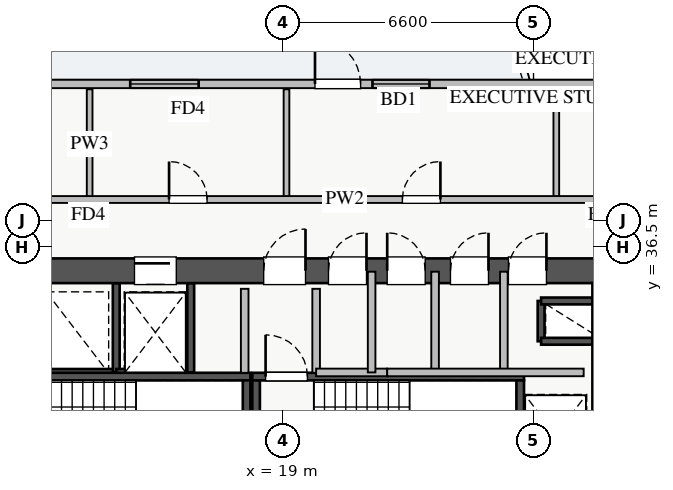
"""IFC4 building model, lengths in metres.
Left out: names, types, materials, properties, quantities, classifications, styles, units other than length and angle.
Written with IfcOpenShell. Run it as: python <this file> out.ifc"""

import sys

from ifc_helpers import new_model, si_unit, direction, frame, frame_2d, origin, place, context, subcontext, project, spatial, rectangle, extrude, source, transform, mapped, element, fill, save


model = new_model("IFC4")
c1 = context("Model", 3, precision=1e-05, world=origin(), true_north=direction((0.0, 1.0)))
c2 = subcontext(c1, "Body", "Model", "MODEL_VIEW")
j1 = project(units=[si_unit("LENGTHUNIT", "METRE"), si_unit("PLANEANGLEUNIT", "RADIAN")], contexts=[c1])
p1 = place(None, origin())
s1 = spatial("IfcSite", under=j1, at=p1, CompositionType="ELEMENT")
p2 = place(p1, origin())
s2 = spatial("IfcBuilding", under=s1, at=p2, CompositionType="ELEMENT")
p3 = place(p2, frame((0.0, 0.0, 113.25)))
s3 = spatial("IfcBuildingStorey", under=s2, at=p3, CompositionType="ELEMENT", Elevation=113.25)
p4 = place(p3, frame((12.68, 33.2, 0.0), z_axis=(0.0, 0.0, 1.0), x_axis=(1.0, 0.0, 0.0)))
e1 = element("IfcWall", 1, at=p4, inside=s3, PredefinedType="SHEAR", context=c2, shape_type="SweptSolid", body=[
    extrude(rectangle(XDim=1.94, YDim=0.18, at=frame_2d((0.97, 0.0))), origin(), (0.0, 0.0, 1.0), 3.07),
])
p5 = place(p3, frame((14.62, 33.2, 0.0), z_axis=(0.0, 0.0, 1.0), x_axis=(0.0, 1.0, 0.0)))
e2 = element("IfcWall", 2, at=p5, inside=s3, PredefinedType="SHEAR", context=c2, shape_type="SweptSolid", body=[
    extrude(rectangle(XDim=2.35, YDim=0.18, at=frame_2d((1.175, 0.0))), origin(), (0.0, 0.0, 1.0), 3.07),
])
p6 = place(p3, frame((25.8, 34.02, 0.0), z_axis=(0.0, 0.0, 1.0), x_axis=(0.0, 1.0, 0.0)))
e3 = element("IfcWall", 3, at=p6, inside=s3, PredefinedType="SHEAR", context=c2, shape_type="SweptSolid", body=[
    extrude(rectangle(XDim=1.06, YDim=0.18, at=frame_2d((0.53, 0.0))), origin(), (0.0, 0.0, 1.0), 3.07),
])
for number, where, z_axis, x_axis in (
    (4, (25.8, 35.08, 0.0), (0.0, 0.0, 1.0), (1.0, 0.0, 0.0)),
    (5, (25.8, 34.02, 0.0), (0.0, 0.0, 1.0), (1.0, 0.0, 0.0)),
):
    element("IfcWall", number, at=place(p3, frame(where, z_axis=z_axis, x_axis=x_axis)), inside=s3, PredefinedType="SHEAR", context=c2, shape_type="SweptSolid", body=[
        extrude(rectangle(XDim=1.35, YDim=0.18, at=frame_2d((0.675, 0.0))), origin(), (0.0, 0.0, 1.0), 3.07),
    ])
p7 = place(p3, frame((14.62, 33.2, 0.0), z_axis=(0.0, 0.0, 1.0), x_axis=(1.0, 0.0, 0.0)))
e6 = element("IfcWall", 6, at=p7, inside=s3, PredefinedType="SHEAR", context=c2, shape_type="SweptSolid", body=[
    extrude(rectangle(XDim=1.96, YDim=0.18, at=frame_2d((0.98, 0.0))), origin(), (0.0, 0.0, 1.0), 3.07),
])
p8 = place(p3, frame((16.58, 33.2, 0.0), z_axis=(0.0, 0.0, 1.0), x_axis=(0.0, 1.0, 0.0)))
e7 = element("IfcWall", 7, at=p8, inside=s3, PredefinedType="SHEAR", context=c2, shape_type="SweptSolid", body=[
    extrude(rectangle(XDim=2.35, YDim=0.18, at=frame_2d((1.175, 0.0))), origin(), (0.0, 0.0, 1.0), 3.07),
])
p9 = place(p3, frame((10.85, 33.09, 0.0), z_axis=(0.0, 0.0, 1.0), x_axis=(1.0, 0.0, 0.0)))
e8 = element("IfcWall", 8, at=p9, inside=s3, PredefinedType="SHEAR", context=c2, shape_type="SweptSolid", body=[
    extrude(rectangle(XDim=7.3, YDim=0.2, at=frame_2d((3.65, 0.0))), origin(), (0.0, 0.0, 1.0), 3.25),
])
p10 = place(p9, frame((0.35, 0.0, 0.0)))
e9 = element("IfcOpeningElement", 9, at=p10, cuts=e8, PredefinedType="OPENING", context=c2, shape_type="SweptSolid", body=[
    extrude(rectangle(XDim=1.1, YDim=2.05, at=frame_2d((0.55, 1.025))), frame((0.0, 0.11, 0.0), z_axis=(0.0, -1.0, 0.0), x_axis=(1.0, 0.0, 0.0)), (0.0, 0.0, 1.0), 0.22),
])
p11 = place(p3, frame((18.05, 30.05, 0.0), z_axis=(0.0, 0.0, 1.0), x_axis=(0.0, 1.0, 0.0)))
e10 = element("IfcWall", 10, at=p11, inside=s3, PredefinedType="SHEAR", context=c2, shape_type="SweptSolid", body=[
    extrude(rectangle(XDim=2.94, YDim=0.2, at=frame_2d((1.47, 0.0))), origin(), (0.0, 0.0, 1.0), 3.25),
])
p12 = place(p3, frame((18.2, 33.09, 0.0), z_axis=(0.0, 0.0, 1.0), x_axis=(1.0, 0.0, 0.0)))
e11 = element("IfcWall", 11, at=p12, inside=s3, PredefinedType="SHEAR", context=c2, shape_type="SweptSolid", body=[
    extrude(rectangle(XDim=7.15, YDim=0.2, at=frame_2d((3.575, 0.0))), origin(), (0.0, 0.0, 1.0), 3.25),
])
p13 = place(p12, frame((0.35, 0.0, 0.0)))
e12 = element("IfcOpeningElement", 12, at=p13, cuts=e11, PredefinedType="OPENING", context=c2, shape_type="SweptSolid", body=[
    extrude(rectangle(XDim=1.1, YDim=2.05, at=frame_2d((0.55, 1.025))), frame((0.0, 0.11, 0.0), z_axis=(0.0, -1.0, 0.0), x_axis=(1.0, 0.0, 0.0)), (0.0, 0.0, 1.0), 0.22),
])
for number, where, z_axis, x_axis in (
    (13, (18.3, 30.05, 0.0), (0.0, 0.0, 1.0), (0.0, 1.0, 0.0)),
    (14, (25.25, 30.05, 0.0), (0.0, 0.0, 1.0), (0.0, 1.0, 0.0)),
):
    element("IfcWall", number, at=place(p3, frame(where, z_axis=z_axis, x_axis=x_axis)), inside=s3, PredefinedType="SHEAR", context=c2, shape_type="SweptSolid", body=[
        extrude(rectangle(XDim=2.94, YDim=0.2, at=frame_2d((1.47, 0.0))), origin(), (0.0, 0.0, 1.0), 3.25),
    ])
p14 = place(p3, frame((10.2, 35.875, 0.0), z_axis=(0.0, 0.0, 1.0), x_axis=(1.0, 0.0, 0.0)))
e15 = element("IfcWall", 15, at=p14, inside=s3, PredefinedType="SHEAR", context=c2, shape_type="SweptSolid", body=[
    extrude(rectangle(XDim=17.6, YDim=0.65, at=frame_2d((8.8, 0.0))), origin(), (0.0, 0.0, 1.0), 3.25),
])
p15 = place(p14, frame((1.15, 0.0, 0.0)))
e16 = element("IfcOpeningElement", 16, at=p15, cuts=e15, PredefinedType="OPENING", context=c2, shape_type="SweptSolid", body=[
    extrude(rectangle(XDim=1.1, YDim=2.05, at=frame_2d((0.55, 1.025))), frame((0.0, 0.335, 0.0), z_axis=(0.0, -1.0, 0.0), x_axis=(1.0, 0.0, 0.0)), (0.0, 0.0, 1.0), 0.67),
])
p16 = place(p14, frame((8.3, 0.0, 0.0)))
e17 = element("IfcOpeningElement", 17, at=p16, cuts=e15, PredefinedType="OPENING", context=c2, shape_type="SweptSolid", body=[
    extrude(rectangle(XDim=1.1, YDim=2.05, at=frame_2d((0.55, 1.025))), frame((0.0, 0.335, 0.0), z_axis=(0.0, -1.0, 0.0), x_axis=(1.0, 0.0, 0.0)), (0.0, 0.0, 1.0), 0.67),
])
p17 = place(p14, frame((4.9, 0.0, 0.0)))
e18 = element("IfcOpeningElement", 18, at=p17, cuts=e15, PredefinedType="OPENING", context=c2, shape_type="SweptSolid", body=[
    extrude(rectangle(XDim=1.1, YDim=2.05, at=frame_2d((0.55, 1.025))), frame((0.0, 0.335, 0.0), z_axis=(0.0, -1.0, 0.0), x_axis=(1.0, 0.0, 0.0)), (0.0, 0.0, 1.0), 0.67),
])
p18 = place(p14, frame((14.74, 0.0, 0.0)))
e19 = element("IfcOpeningElement", 19, at=p18, cuts=e15, PredefinedType="OPENING", context=c2, shape_type="SweptSolid", body=[
    extrude(rectangle(XDim=1.0, YDim=2.05, at=frame_2d((0.5, 1.025))), frame((0.0, 0.335, 0.0), z_axis=(0.0, -1.0, 0.0), x_axis=(1.0, 0.0, 0.0)), (0.0, 0.0, 1.0), 0.67),
])
p19 = place(p14, frame((10.005, 0.0, 0.0)))
e20 = element("IfcOpeningElement", 20, at=p19, cuts=e15, PredefinedType="OPENING", context=c2, shape_type="SweptSolid", body=[
    extrude(rectangle(XDim=1.0, YDim=2.05, at=frame_2d((0.5, 1.025))), frame((0.0, 0.335, 0.0), z_axis=(0.0, -1.0, 0.0), x_axis=(1.0, 0.0, 0.0)), (0.0, 0.0, 1.0), 0.67),
])
p20 = place(p14, frame((11.55, 0.0, 0.0)))
e21 = element("IfcOpeningElement", 21, at=p20, cuts=e15, PredefinedType="OPENING", context=c2, shape_type="SweptSolid", body=[
    extrude(rectangle(XDim=1.0, YDim=2.05, at=frame_2d((0.5, 1.025))), frame((0.0, 0.335, 0.0), z_axis=(0.0, -1.0, 0.0), x_axis=(1.0, 0.0, 0.0)), (0.0, 0.0, 1.0), 0.67),
])
p21 = place(p14, frame((13.215, 0.0, 0.0)))
e22 = element("IfcOpeningElement", 22, at=p21, cuts=e15, PredefinedType="OPENING", context=c2, shape_type="SweptSolid", body=[
    extrude(rectangle(XDim=1.0, YDim=2.05, at=frame_2d((0.5, 1.025))), frame((0.0, 0.335, 0.0), z_axis=(0.0, -1.0, 0.0), x_axis=(1.0, 0.0, 0.0)), (0.0, 0.0, 1.0), 0.67),
])
p22 = place(p3, frame((27.475, 29.65, 0.0), z_axis=(0.0, 0.0, 1.0), x_axis=(0.0, 1.0, 0.0)))
e23 = element("IfcWall", 23, at=p22, inside=s3, PredefinedType="SHEAR", context=c2, shape_type="SweptSolid", body=[
    extrude(rectangle(XDim=5.9, YDim=0.65, at=frame_2d((2.95, 0.0))), origin(), (0.0, 0.0, 1.0), 3.25),
])
p23 = place(p22, frame((1.1, 0.0, 0.0)))
e24 = element("IfcOpeningElement", 24, at=p23, cuts=e23, PredefinedType="OPENING", context=c2, shape_type="SweptSolid", body=[
    extrude(rectangle(XDim=1.3, YDim=2.05, at=frame_2d((0.65, 1.025))), frame((0.0, 0.335, 0.0), z_axis=(0.0, -1.0, 0.0), x_axis=(1.0, 0.0, 0.0)), (0.0, 0.0, 1.0), 0.67),
])
p24 = place(p3, frame((6.55, 40.79, 0.0), z_axis=(0.0, 0.0, 1.0), x_axis=(1.0, 0.0, 0.0)))
e25 = element("IfcWall", 25, at=p24, inside=s3, PredefinedType="STANDARD", context=c2, shape_type="SweptSolid", body=[
    extrude(rectangle(XDim=24.9, YDim=0.22, at=frame_2d((12.45, 0.0))), origin(), (0.0, 0.0, 1.0), 2.61),
])
p25 = place(p24, frame((13.3, 0.0, 0.0)))
e26 = element("IfcOpeningElement", 26, at=p25, cuts=e25, PredefinedType="OPENING", context=c2, shape_type="SweptSolid", body=[
    extrude(rectangle(XDim=1.2, YDim=2.1, at=frame_2d((0.6, 1.05))), frame((0.0, 0.12, 0.0), z_axis=(0.0, -1.0, 0.0), x_axis=(1.0, 0.0, 0.0)), (0.0, 0.0, 1.0), 0.24),
])
p26 = place(p24, frame((3.635, 0.0, 0.9)))
e27 = element("IfcOpeningElement", 27, at=p26, cuts=e25, PredefinedType="OPENING", context=c2, shape_type="SweptSolid", body=[
    extrude(rectangle(XDim=2.4, YDim=1.5, at=frame_2d((1.2, 0.75))), frame((0.0, 0.12, 0.0), z_axis=(0.0, -1.0, 0.0), x_axis=(1.0, 0.0, 0.0)), (0.0, 0.0, 1.0), 0.24),
])
p27 = place(p24, frame((8.438, 0.0, 0.9)))
e28 = element("IfcOpeningElement", 28, at=p27, cuts=e25, PredefinedType="OPENING", context=c2, shape_type="SweptSolid", body=[
    extrude(rectangle(XDim=1.8, YDim=1.45, at=frame_2d((0.9, 0.725))), frame((0.0, 0.12, 0.0), z_axis=(0.0, -1.0, 0.0), x_axis=(1.0, 0.0, 0.0)), (0.0, 0.0, 1.0), 0.24),
])
p28 = place(p24, frame((14.813, 0.0, 0.9)))
e29 = element("IfcOpeningElement", 29, at=p28, cuts=e25, PredefinedType="OPENING", context=c2, shape_type="SweptSolid", body=[
    extrude(rectangle(XDim=1.5, YDim=1.45, at=frame_2d((0.75, 0.725))), frame((0.0, 0.12, 0.0), z_axis=(0.0, -1.0, 0.0), x_axis=(1.0, 0.0, 0.0)), (0.0, 0.0, 1.0), 0.24),
])
p29 = place(p24, frame((20.738, 0.0, 0.9)))
e30 = element("IfcOpeningElement", 30, at=p29, cuts=e25, PredefinedType="OPENING", context=c2, shape_type="SweptSolid", body=[
    extrude(rectangle(XDim=2.1, YDim=1.48, at=frame_2d((1.05, 0.74))), frame((0.0, 0.12, 0.0), z_axis=(0.0, -1.0, 0.0), x_axis=(1.0, 0.0, 0.0)), (0.0, 0.0, 1.0), 0.24),
])
p30 = place(p24, frame((0.258, 0.0, 0.9)))
e31 = element("IfcOpeningElement", 31, at=p30, cuts=e25, PredefinedType="OPENING", context=c2, shape_type="SweptSolid", body=[
    extrude(rectangle(XDim=1.8, YDim=1.5, at=frame_2d((0.9, 0.75))), frame((0.0, 0.12, 0.0), z_axis=(0.0, -1.0, 0.0), x_axis=(1.0, 0.0, 0.0)), (0.0, 0.0, 1.0), 0.24),
])
for number, where, z_axis, x_axis in (
    (32, (18.0, 33.19, 0.0), (0.0, 0.0, 1.0), (0.0, 1.0, 0.0)),
    (33, (19.88, 33.19, 0.0), (0.0, 0.0, 1.0), (0.0, 1.0, 0.0)),
):
    element("IfcWall", number, at=place(p3, frame(where, z_axis=z_axis, x_axis=x_axis)), inside=s3, PredefinedType="PARTITIONING", context=c2, shape_type="SweptSolid", body=[
        extrude(rectangle(XDim=2.21, YDim=0.2, at=frame_2d((1.105, 0.0))), origin(), (0.0, 0.0, 1.0), 3.07),
    ])
p31 = place(p3, frame((24.82, 33.2, 0.0), z_axis=(0.0, 0.0, 1.0), x_axis=(0.0, 1.0, 0.0)))
e34 = element("IfcWall", 34, at=p31, inside=s3, PredefinedType="PARTITIONING", context=c2, shape_type="SweptSolid", body=[
    extrude(rectangle(XDim=2.65, YDim=0.2, at=frame_2d((1.325, 0.0))), origin(), (0.0, 0.0, 1.0), 3.07),
])
p32 = place(p3, frame((19.88, 33.2, 0.0), z_axis=(0.0, 0.0, 1.0), x_axis=(1.0, 0.0, 0.0)))
e35 = element("IfcWall", 35, at=p32, inside=s3, PredefinedType="PARTITIONING", context=c2, shape_type="SweptSolid", body=[
    extrude(rectangle(XDim=1.87, YDim=0.2, at=frame_2d((0.935, 0.0))), origin(), (0.0, 0.0, 1.0), 3.07),
])
for number, where, z_axis, x_axis in (
    (36, (21.34, 33.2, 0.0), (0.0, 0.0, 1.0), (0.0, 1.0, 0.0)),
    (37, (23.01, 33.2, 0.0), (0.0, 0.0, 1.0), (0.0, 1.0, 0.0)),
):
    element("IfcWall", number, at=place(p3, frame(where, z_axis=z_axis, x_axis=x_axis)), inside=s3, PredefinedType="PARTITIONING", context=c2, shape_type="SweptSolid", body=[
        extrude(rectangle(XDim=2.65, YDim=0.2, at=frame_2d((1.325, 0.0))), origin(), (0.0, 0.0, 1.0), 3.07),
    ])
p33 = place(p3, frame((21.75, 33.2, 0.0), z_axis=(0.0, 0.0, 1.0), x_axis=(1.0, 0.0, 0.0)))
e38 = element("IfcWall", 38, at=p33, inside=s3, PredefinedType="PARTITIONING", context=c2, shape_type="SweptSolid", body=[
    extrude(rectangle(XDim=5.17, YDim=0.2, at=frame_2d((2.585, 0.0))), origin(), (0.0, 0.0, 1.0), 3.07),
])
p34 = place(p3, frame((13.92, 37.75, 0.0), z_axis=(0.0, 0.0, 1.0), x_axis=(0.0, 1.0, 0.0)))
e39 = element("IfcWall", 39, at=p34, inside=s3, PredefinedType="PARTITIONING", context=c2, shape_type="SweptSolid", body=[
    extrude(rectangle(XDim=2.9, YDim=0.15, at=frame_2d((1.45, 0.0))), origin(), (0.0, 0.0, 1.0), 3.07),
])
p35 = place(p3, frame((19.1, 37.75, 0.0), z_axis=(0.0, 0.0, 1.0), x_axis=(0.0, 1.0, 0.0)))
e40 = element("IfcWall", 40, at=p35, inside=s3, PredefinedType="PARTITIONING", context=c2, shape_type="SweptSolid", body=[
    extrude(rectangle(XDim=2.9, YDim=0.15, at=frame_2d((1.45, 0.0))), origin(), (0.0, 0.0, 1.0), 2.771),
])
p36 = place(p3, frame((26.2, 37.75, 0.0), z_axis=(0.0, 0.0, 1.0), x_axis=(0.0, 1.0, 0.0)))
e41 = element("IfcWall", 41, at=p36, inside=s3, PredefinedType="PARTITIONING", context=c2, shape_type="SweptSolid", body=[
    extrude(rectangle(XDim=2.9, YDim=0.15, at=frame_2d((1.45, 0.0))), origin(), (0.0, 0.0, 1.0), 3.07),
])
p37 = place(p3, frame((8.85, 37.75, 0.0), z_axis=(0.0, 0.0, 1.0), x_axis=(1.0, 0.0, 0.0)))
e42 = element("IfcWall", 42, at=p37, inside=s3, PredefinedType="PARTITIONING", context=c2, shape_type="SweptSolid", body=[
    extrude(rectangle(XDim=23.57, YDim=0.18, at=frame_2d((11.785, 0.0))), origin(), (0.0, 0.0, 1.0), 3.07),
])
p38 = place(p37, frame((2.035, 0.0, 0.0)))
e43 = element("IfcOpeningElement", 43, at=p38, cuts=e42, PredefinedType="OPENING", context=c2, shape_type="SweptSolid", body=[
    extrude(rectangle(XDim=1.0, YDim=2.05, at=frame_2d((0.5, 1.025))), frame((0.0, 0.1, 0.0), z_axis=(0.0, -1.0, 0.0), x_axis=(1.0, 0.0, 0.0)), (0.0, 0.0, 1.0), 0.2),
])
p39 = place(p37, frame((7.16, 0.0, 0.0)))
e44 = element("IfcOpeningElement", 44, at=p39, cuts=e42, PredefinedType="OPENING", context=c2, shape_type="SweptSolid", body=[
    extrude(rectangle(XDim=1.0, YDim=2.05, at=frame_2d((0.5, 1.025))), frame((0.0, 0.1, 0.0), z_axis=(0.0, -1.0, 0.0), x_axis=(1.0, 0.0, 0.0)), (0.0, 0.0, 1.0), 0.2),
])
p40 = place(p37, frame((13.3, 0.0, 0.0)))
e45 = element("IfcOpeningElement", 45, at=p40, cuts=e42, PredefinedType="OPENING", context=c2, shape_type="SweptSolid", body=[
    extrude(rectangle(XDim=1.0, YDim=2.05, at=frame_2d((0.5, 1.025))), frame((0.0, 0.1, 0.0), z_axis=(0.0, -1.0, 0.0), x_axis=(1.0, 0.0, 0.0)), (0.0, 0.0, 1.0), 0.2),
])
p41 = place(p37, frame((19.74, 0.0, 0.0)))
e46 = element("IfcOpeningElement", 46, at=p41, cuts=e42, PredefinedType="OPENING", context=c2, shape_type="SweptSolid", body=[
    extrude(rectangle(XDim=1.0, YDim=2.05, at=frame_2d((0.5, 1.025))), frame((0.0, 0.1, 0.0), z_axis=(0.0, -1.0, 0.0), x_axis=(1.0, 0.0, 0.0)), (0.0, 0.0, 1.0), 0.2),
])
m1 = source(origin(), c2, "Body", "SweptSolid", [
    extrude(rectangle(XDim=1.2, YDim=2.1, at=frame_2d((0.6, 1.05))), frame((0.0, 0.025, 0.0), z_axis=(0.0, -1.0, 0.0), x_axis=(1.0, 0.0, 0.0)), (0.0, 0.0, 1.0), 0.05),
])
p42 = place(p25, origin())
e47 = element("IfcDoor", 47, at=p42, inside=s3, OperationType="SINGLE_SWING_LEFT", PredefinedType="DOOR", context=c2, shape_type="MappedRepresentation", body=[
    mapped(m1, transform((0.0, 0.0, 0.0), x_axis=(1.0, 0.0, 0.0), y_axis=(0.0, 1.0, 0.0), z_axis=(0.0, 0.0, 1.0), scale=1.0)),
])
fill(e26, e47)
m2 = source(origin(), c2, "Body", "SweptSolid", [
    extrude(rectangle(XDim=1.8, YDim=1.45, at=frame_2d((0.9, 0.725))), frame((0.0, 0.03, 0.0), z_axis=(0.0, -1.0, 0.0), x_axis=(1.0, 0.0, 0.0)), (0.0, 0.0, 1.0), 0.06),
])
p43 = place(p27, origin())
e48 = element("IfcWindow", 48, at=p43, inside=s3, PartitioningType="DOUBLE_PANEL_VERTICAL", PredefinedType="WINDOW", context=c2, shape_type="MappedRepresentation", body=[
    mapped(m2, transform((0.0, 0.0, 0.0), x_axis=(1.0, 0.0, 0.0), y_axis=(0.0, 1.0, 0.0), z_axis=(0.0, 0.0, 1.0), scale=1.0)),
])
fill(e28, e48)
m3 = source(origin(), c2, "Body", "SweptSolid", [
    extrude(rectangle(XDim=1.5, YDim=1.45, at=frame_2d((0.75, 0.725))), frame((0.0, 0.03, 0.0), z_axis=(0.0, -1.0, 0.0), x_axis=(1.0, 0.0, 0.0)), (0.0, 0.0, 1.0), 0.06),
])
p44 = place(p28, origin())
e49 = element("IfcWindow", 49, at=p44, inside=s3, PartitioningType="DOUBLE_PANEL_VERTICAL", PredefinedType="WINDOW", context=c2, shape_type="MappedRepresentation", body=[
    mapped(m3, transform((0.0, 0.0, 0.0), x_axis=(1.0, 0.0, 0.0), y_axis=(0.0, 1.0, 0.0), z_axis=(0.0, 0.0, 1.0), scale=1.0)),
])
fill(e29, e49)
m4 = source(origin(), c2, "Body", "SweptSolid", [
    extrude(rectangle(XDim=1.1, YDim=2.05, at=frame_2d((0.55, 1.025))), frame((0.0, 0.025, 0.0), z_axis=(0.0, -1.0, 0.0), x_axis=(1.0, 0.0, 0.0)), (0.0, 0.0, 1.0), 0.05),
])
p45 = place(p16, origin())
e50 = element("IfcDoor", 50, at=p45, inside=s3, OperationType="SINGLE_SWING_RIGHT", PredefinedType="DOOR", context=c2, shape_type="MappedRepresentation", body=[
    mapped(m4, transform((0.0, 0.0, 0.0), x_axis=(1.0, 0.0, 0.0), y_axis=(0.0, 1.0, 0.0), z_axis=(0.0, 0.0, 1.0), scale=1.0)),
])
fill(e17, e50)
p46 = place(p13, origin())
e51 = element("IfcDoor", 51, at=p46, inside=s3, OperationType="SINGLE_SWING_LEFT", PredefinedType="DOOR", context=c2, shape_type="MappedRepresentation", body=[
    mapped(m4, transform((0.0, 0.0, 0.0), x_axis=(1.0, 0.0, 0.0), y_axis=(0.0, 1.0, 0.0), z_axis=(0.0, 0.0, 1.0), scale=1.0)),
])
fill(e12, e51)
p47 = place(p17, origin())
e52 = element("IfcDoor", 52, at=p47, inside=s3, OperationType="SLIDING_TO_LEFT", PredefinedType="DOOR", context=c2, shape_type="MappedRepresentation", body=[
    mapped(m4, transform((0.0, 0.0, 0.0), x_axis=(1.0, 0.0, 0.0), y_axis=(0.0, 1.0, 0.0), z_axis=(0.0, 0.0, 1.0), scale=1.0)),
])
fill(e18, e52)
m5 = source(origin(), c2, "Body", "SweptSolid", [
    extrude(rectangle(XDim=1.0, YDim=2.05, at=frame_2d((0.5, 1.025))), frame((0.0, 0.025, 0.0), z_axis=(0.0, -1.0, 0.0), x_axis=(1.0, 0.0, 0.0)), (0.0, 0.0, 1.0), 0.05),
])
p48 = place(p18, origin())
e53 = element("IfcDoor", 53, at=p48, inside=s3, OperationType="SINGLE_SWING_RIGHT", PredefinedType="DOOR", context=c2, shape_type="MappedRepresentation", body=[
    mapped(m5, transform((0.0, 0.0, 0.0), x_axis=(1.0, 0.0, 0.0), y_axis=(0.0, 1.0, 0.0), z_axis=(0.0, 0.0, 1.0), scale=1.0)),
])
fill(e19, e53)
p49 = place(p19, origin())
e54 = element("IfcDoor", 54, at=p49, inside=s3, OperationType="SINGLE_SWING_RIGHT", PredefinedType="DOOR", context=c2, shape_type="MappedRepresentation", body=[
    mapped(m5, transform((0.0, 0.0, 0.0), x_axis=(1.0, 0.0, 0.0), y_axis=(0.0, 1.0, 0.0), z_axis=(0.0, 0.0, 1.0), scale=1.0)),
])
fill(e20, e54)
p50 = place(p20, origin())
e55 = element("IfcDoor", 55, at=p50, inside=s3, OperationType="SINGLE_SWING_LEFT", PredefinedType="DOOR", context=c2, shape_type="MappedRepresentation", body=[
    mapped(m5, transform((0.0, 0.0, 0.0), x_axis=(1.0, 0.0, 0.0), y_axis=(0.0, 1.0, 0.0), z_axis=(0.0, 0.0, 1.0), scale=1.0)),
])
fill(e21, e55)
p51 = place(p21, origin())
e56 = element("IfcDoor", 56, at=p51, inside=s3, OperationType="SINGLE_SWING_RIGHT", PredefinedType="DOOR", context=c2, shape_type="MappedRepresentation", body=[
    mapped(m5, transform((0.0, 0.0, 0.0), x_axis=(1.0, 0.0, 0.0), y_axis=(0.0, 1.0, 0.0), z_axis=(0.0, 0.0, 1.0), scale=1.0)),
])
fill(e22, e56)
p52 = place(p39, origin())
e57 = element("IfcDoor", 57, at=p52, inside=s3, OperationType="SINGLE_SWING_LEFT", PredefinedType="DOOR", context=c2, shape_type="MappedRepresentation", body=[
    mapped(m5, transform((0.0, 0.0, 0.0), x_axis=(1.0, 0.0, 0.0), y_axis=(0.0, 1.0, 0.0), z_axis=(0.0, 0.0, 1.0), scale=1.0)),
])
fill(e44, e57)
p53 = place(p40, origin())
e58 = element("IfcDoor", 58, at=p53, inside=s3, OperationType="SINGLE_SWING_RIGHT", PredefinedType="DOOR", context=c2, shape_type="MappedRepresentation", body=[
    mapped(m5, transform((0.0, 0.0, 0.0), x_axis=(1.0, 0.0, 0.0), y_axis=(0.0, 1.0, 0.0), z_axis=(0.0, 0.0, 1.0), scale=1.0)),
])
fill(e45, e58)
save(model, sys.argv[1])
